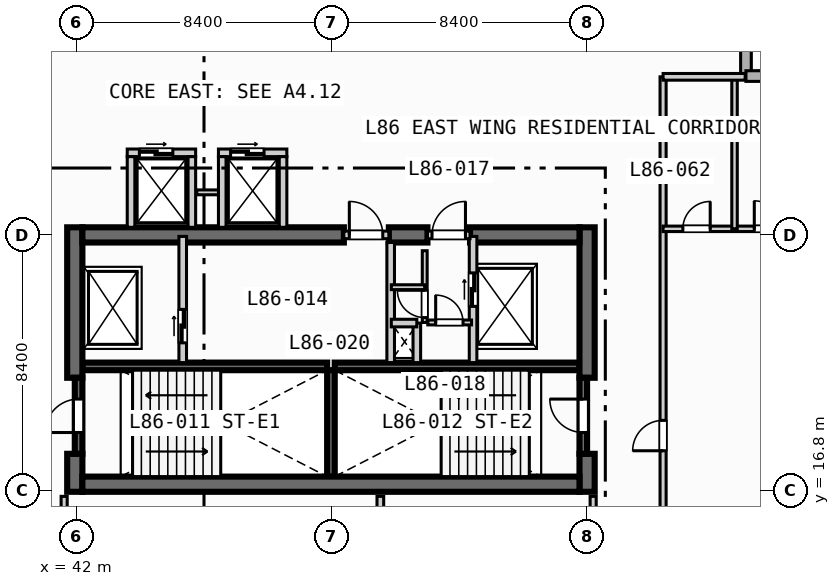
"""IFC4 building model, lengths in metres.
Left out: names, types, materials, properties, quantities, classifications, styles, units other than length and angle.
Written with IfcOpenShell. Run it as: python <this file> out.ifc"""

import sys

from ifc_helpers import new_model, si_unit, direction, frame, frame_2d, origin, place, context, subcontext, project, spatial, rectangle, extrude, element, fill, save


model = new_model("IFC4")
c1 = context("Model", 3, precision=1e-05, world=origin(), true_north=direction((0.0, 1.0)))
c2 = subcontext(c1, "Body", "Model", "MODEL_VIEW")
j1 = project(units=[si_unit("LENGTHUNIT", "METRE"), si_unit("PLANEANGLEUNIT", "RADIAN")], contexts=[c1])
p1 = place(None, origin())
s1 = spatial("IfcSite", under=j1, at=p1, CompositionType="ELEMENT")
p2 = place(p1, origin())
s2 = spatial("IfcBuilding", under=s1, at=p2, CompositionType="ELEMENT")
p3 = place(p2, frame((0.0, 0.0, 347.6)))
s3 = spatial("IfcBuildingStorey", under=s2, at=p3, CompositionType="ELEMENT", Elevation=347.6)
for number, where, z_axis, x_axis in (
    (1, (42.2, 20.875, 0.0), (0.0, 0.0, 1.0), (1.0, 0.0, 0.0)),
    (2, (50.5, 20.875, 0.0), (0.0, 0.0, 1.0), (1.0, 0.0, 0.0)),
):
    element("IfcWall", number, at=place(p3, frame(where, z_axis=z_axis, x_axis=x_axis)), inside=s3, PredefinedType="SOLIDWALL", context=c2, shape_type="SweptSolid", body=[
        extrude(rectangle(XDim=8.05, YDim=0.25, at=frame_2d((4.025, 0.0))), origin(), (0.0, 0.0, 1.0), 3.67),
    ])
p4 = place(p3, frame((50.375, 17.25, 0.0), z_axis=(0.0, 0.0, 1.0), x_axis=(0.0, 1.0, 0.0)))
e3 = element("IfcWall", 3, at=p4, inside=s3, PredefinedType="SOLIDWALL", context=c2, shape_type="SweptSolid", body=[
    extrude(rectangle(XDim=3.5, YDim=0.25, at=frame_2d((1.75, 0.0))), origin(), (0.0, 0.0, 1.0), 3.67),
])
p5 = place(p3, frame((41.95, 16.75, 0.0), z_axis=(0.0, 0.0, 1.0), x_axis=(0.0, 1.0, 0.0)))
e4 = element("IfcWall", 4, at=p5, inside=s3, PredefinedType="SHEAR", context=c2, shape_type="SweptSolid", body=[
    extrude(rectangle(XDim=1.25, YDim=0.5, at=frame_2d((0.625, 0.0))), origin(), (0.0, 0.0, 1.0), 3.67),
])
p6 = place(p3, frame((41.95, 20.5, 0.0), z_axis=(0.0, 0.0, 1.0), x_axis=(0.0, 1.0, 0.0)))
e5 = element("IfcWall", 5, at=p6, inside=s3, PredefinedType="SHEAR", context=c2, shape_type="SweptSolid", body=[
    extrude(rectangle(XDim=4.95, YDim=0.5, at=frame_2d((2.475, 0.0))), origin(), (0.0, 0.0, 1.0), 3.67),
])
p7 = place(p3, frame((58.8, 16.75, 0.0), z_axis=(0.0, 0.0, 1.0), x_axis=(0.0, 1.0, 0.0)))
e6 = element("IfcWall", 6, at=p7, inside=s3, PredefinedType="SHEAR", context=c2, shape_type="SweptSolid", body=[
    extrude(rectangle(XDim=1.25, YDim=0.5, at=frame_2d((0.625, 0.0))), origin(), (0.0, 0.0, 1.0), 3.67),
])
p8 = place(p3, frame((58.8, 20.5, 0.0), z_axis=(0.0, 0.0, 1.0), x_axis=(0.0, 1.0, 0.0)))
e7 = element("IfcWall", 7, at=p8, inside=s3, PredefinedType="SHEAR", context=c2, shape_type="SweptSolid", body=[
    extrude(rectangle(XDim=4.95, YDim=0.5, at=frame_2d((2.475, 0.0))), origin(), (0.0, 0.0, 1.0), 3.67),
])
p9 = place(p3, frame((42.2, 17.0, 0.0), z_axis=(0.0, 0.0, 1.0), x_axis=(1.0, 0.0, 0.0)))
e8 = element("IfcWall", 8, at=p9, inside=s3, PredefinedType="SHEAR", context=c2, shape_type="SweptSolid", body=[
    extrude(rectangle(XDim=16.35, YDim=0.5, at=frame_2d((8.175, 0.0))), origin(), (0.0, 0.0, 1.0), 3.67),
])
p10 = place(p3, frame((42.2, 25.2, 0.0), z_axis=(0.0, 0.0, 1.0), x_axis=(1.0, 0.0, 0.0)))
e9 = element("IfcWall", 9, at=p10, inside=s3, PredefinedType="SHEAR", context=c2, shape_type="SweptSolid", body=[
    extrude(rectangle(XDim=8.6, YDim=0.5, at=frame_2d((4.3, 0.0))), origin(), (0.0, 0.0, 1.0), 3.67),
])
p11 = place(p3, frame((52.28, 25.2, 0.0), z_axis=(0.0, 0.0, 1.0), x_axis=(1.0, 0.0, 0.0)))
e10 = element("IfcWall", 10, at=p11, inside=s3, PredefinedType="SHEAR", context=c2, shape_type="SweptSolid", body=[
    extrude(rectangle(XDim=1.27, YDim=0.5, at=frame_2d((0.635, 0.0))), origin(), (0.0, 0.0, 1.0), 3.67),
])
p12 = place(p3, frame((54.95, 25.2, 0.0), z_axis=(0.0, 0.0, 1.0), x_axis=(1.0, 0.0, 0.0)))
e11 = element("IfcWall", 11, at=p12, inside=s3, PredefinedType="SHEAR", context=c2, shape_type="SweptSolid", body=[
    extrude(rectangle(XDim=3.6, YDim=0.5, at=frame_2d((1.8, 0.0))), origin(), (0.0, 0.0, 1.0), 3.67),
])
for number, where, z_axis, x_axis in (
    (12, (64.025, 33.425, 0.0), (0.0, 0.0, 1.0), (0.0, -1.0, 0.0)),
    (13, (64.025, 30.425, 0.0), (0.0, 0.0, 1.0), (1.0, 0.0, 0.0)),
):
    element("IfcWall", number, at=place(p3, frame(where, z_axis=z_axis, x_axis=x_axis)), inside=s3, PredefinedType="STANDARD", context=c2, shape_type="SweptSolid", body=[
        extrude(rectangle(XDim=3.0, YDim=0.35, at=frame_2d((1.5, 0.0))), origin(), (0.0, 0.0, 1.0), 3.67),
    ])
p13 = place(p3, frame((42.075, 18.0, 0.0), z_axis=(0.0, 0.0, 1.0), x_axis=(0.0, 1.0, 0.0)))
e14 = element("IfcWall", 14, at=p13, inside=s3, PredefinedType="SOLIDWALL", context=c2, shape_type="SweptSolid", body=[
    extrude(rectangle(XDim=2.5, YDim=0.25, at=frame_2d((1.25, 0.0))), origin(), (0.0, 0.0, 1.0), 3.67),
])
p14 = place(p13, frame((0.7, 0.0, 0.0)))
e15 = element("IfcOpeningElement", 15, at=p14, cuts=e14, PredefinedType="OPENING", context=c2, shape_type="SweptSolid", body=[
    extrude(rectangle(XDim=1.1, YDim=2.15, at=frame_2d((0.55, 1.075))), frame((0.0, 0.135, 0.0), z_axis=(0.0, -1.0, 0.0), x_axis=(1.0, 0.0, 0.0)), (0.0, 0.0, 1.0), 0.27),
])
p15 = place(p3, frame((58.675, 18.0, 0.0), z_axis=(0.0, 0.0, 1.0), x_axis=(0.0, 1.0, 0.0)))
e16 = element("IfcWall", 16, at=p15, inside=s3, PredefinedType="SOLIDWALL", context=c2, shape_type="SweptSolid", body=[
    extrude(rectangle(XDim=2.5, YDim=0.25, at=frame_2d((1.25, 0.0))), origin(), (0.0, 0.0, 1.0), 3.67),
])
p16 = place(p15, frame((0.7, 0.0, 0.0)))
e17 = element("IfcOpeningElement", 17, at=p16, cuts=e16, PredefinedType="OPENING", context=c2, shape_type="SweptSolid", body=[
    extrude(rectangle(XDim=1.1, YDim=2.15, at=frame_2d((0.55, 1.075))), frame((0.0, 0.135, 0.0), z_axis=(0.0, -1.0, 0.0), x_axis=(1.0, 0.0, 0.0)), (0.0, 0.0, 1.0), 0.27),
])
p17 = place(p3, frame((45.5, 21.0, 0.0), z_axis=(0.0, 0.0, 1.0), x_axis=(0.0, 1.0, 0.0)))
e18 = element("IfcWall", 18, at=p17, inside=s3, PredefinedType="SOLIDWALL", context=c2, shape_type="SweptSolid", body=[
    extrude(rectangle(XDim=4.15, YDim=0.25, at=frame_2d((2.075, 0.0))), origin(), (0.0, 0.0, 1.0), 3.67),
])
p18 = place(p17, frame((0.65, 0.0, 0.0)))
e19 = element("IfcOpeningElement", 19, at=p18, cuts=e18, PredefinedType="OPENING", context=c2, shape_type="SweptSolid", body=[
    extrude(rectangle(XDim=1.1, YDim=2.15, at=frame_2d((0.55, 1.075))), frame((0.0, 0.135, 0.0), z_axis=(0.0, -1.0, 0.0), x_axis=(1.0, 0.0, 0.0)), (0.0, 0.0, 1.0), 0.27),
])
p19 = place(p3, frame((50.8, 25.2, 0.0), z_axis=(0.0, 0.0, 1.0), x_axis=(1.0, 0.0, 0.0)))
e20 = element("IfcWall", 20, at=p19, inside=s3, PredefinedType="SOLIDWALL", context=c2, shape_type="SweptSolid", body=[
    extrude(rectangle(XDim=1.48, YDim=0.25, at=frame_2d((0.74, 0.0))), origin(), (0.0, 0.0, 1.0), 3.67),
])
p20 = place(p19, frame((0.18, 0.0, 0.0)))
e21 = element("IfcOpeningElement", 21, at=p20, cuts=e20, PredefinedType="OPENING", context=c2, shape_type="SweptSolid", body=[
    extrude(rectangle(XDim=1.1, YDim=2.15, at=frame_2d((0.55, 1.075))), frame((0.0, 0.135, 0.0), z_axis=(0.0, -1.0, 0.0), x_axis=(1.0, 0.0, 0.0)), (0.0, 0.0, 1.0), 0.27),
])
p21 = place(p3, frame((52.34, 21.0, 0.0), z_axis=(0.0, 0.0, 1.0), x_axis=(0.0, 1.0, 0.0)))
e22 = element("IfcWall", 22, at=p21, inside=s3, PredefinedType="SOLIDWALL", context=c2, shape_type="SweptSolid", body=[
    extrude(rectangle(XDim=3.95, YDim=0.25, at=frame_2d((1.975, 0.0))), origin(), (0.0, 0.0, 1.0), 3.67),
])
p22 = place(p3, frame((55.05, 21.0, 0.0), z_axis=(0.0, 0.0, 1.0), x_axis=(0.0, 1.0, 0.0)))
e23 = element("IfcWall", 23, at=p22, inside=s3, PredefinedType="SOLIDWALL", context=c2, shape_type="SweptSolid", body=[
    extrude(rectangle(XDim=4.15, YDim=0.25, at=frame_2d((2.075, 0.0))), origin(), (0.0, 0.0, 1.0), 3.67),
])
p23 = place(p22, frame((1.85, 0.0, 0.0)))
e24 = element("IfcOpeningElement", 24, at=p23, cuts=e23, PredefinedType="OPENING", context=c2, shape_type="SweptSolid", body=[
    extrude(rectangle(XDim=1.1, YDim=2.15, at=frame_2d((0.55, 1.075))), frame((0.0, 0.135, 0.0), z_axis=(0.0, -1.0, 0.0), x_axis=(1.0, 0.0, 0.0)), (0.0, 0.0, 1.0), 0.27),
])
p24 = place(p3, frame((53.55, 25.2, 0.0), z_axis=(0.0, 0.0, 1.0), x_axis=(1.0, 0.0, 0.0)))
e25 = element("IfcWall", 25, at=p24, inside=s3, PredefinedType="SOLIDWALL", context=c2, shape_type="SweptSolid", body=[
    extrude(rectangle(XDim=1.4, YDim=0.25, at=frame_2d((0.7, 0.0))), origin(), (0.0, 0.0, 1.0), 3.67),
])
p25 = place(p24, frame((0.15, 0.0, 0.0)))
e26 = element("IfcOpeningElement", 26, at=p25, cuts=e25, PredefinedType="OPENING", context=c2, shape_type="SweptSolid", body=[
    extrude(rectangle(XDim=1.1, YDim=2.15, at=frame_2d((0.55, 1.075))), frame((0.0, 0.135, 0.0), z_axis=(0.0, -1.0, 0.0), x_axis=(1.0, 0.0, 0.0)), (0.0, 0.0, 1.0), 0.27),
])
p26 = place(p3, frame((53.2, 21.0, 0.0), z_axis=(0.0, 0.0, 1.0), x_axis=(0.0, 1.0, 0.0)))
e27 = element("IfcWall", 27, at=p26, inside=s3, PredefinedType="SOLIDWALL", context=c2, shape_type="SweptSolid", body=[
    extrude(rectangle(XDim=1.3, YDim=0.25, at=frame_2d((0.65, 0.0))), origin(), (0.0, 0.0, 1.0), 3.67),
])
p27 = place(p3, frame((52.36, 22.3, 0.0), z_axis=(0.0, 0.0, 1.0), x_axis=(1.0, 0.0, 0.0)))
e28 = element("IfcWall", 28, at=p27, inside=s3, PredefinedType="SOLIDWALL", context=c2, shape_type="SweptSolid", body=[
    extrude(rectangle(XDim=0.84, YDim=0.25, at=frame_2d((0.42, 0.0))), origin(), (0.0, 0.0, 1.0), 3.67),
])
p28 = place(p3, frame((53.56, 22.32, 0.0), z_axis=(0.0, 0.0, 1.0), x_axis=(1.0, 0.0, 0.0)))
e29 = element("IfcWall", 29, at=p28, inside=s3, PredefinedType="PARTITIONING", context=c2, shape_type="SweptSolid", body=[
    extrude(rectangle(XDim=1.44, YDim=0.16, at=frame_2d((0.72, 0.0))), origin(), (0.0, 0.0, 1.0), 3.67),
])
p29 = place(p28, frame((0.26, 0.0, 0.0)))
e30 = element("IfcOpeningElement", 30, at=p29, cuts=e29, PredefinedType="OPENING", context=c2, shape_type="SweptSolid", body=[
    extrude(rectangle(XDim=0.9, YDim=2.1, at=frame_2d((0.45, 1.05))), frame((0.0, 0.09, 0.0), z_axis=(0.0, -1.0, 0.0), x_axis=(1.0, 0.0, 0.0)), (0.0, 0.0, 1.0), 0.18),
])
p30 = place(p3, frame((53.46, 22.32, 0.0), z_axis=(0.0, 0.0, 1.0), x_axis=(0.0, 1.0, 0.0)))
e31 = element("IfcWall", 31, at=p30, inside=s3, PredefinedType="PARTITIONING", context=c2, shape_type="SweptSolid", body=[
    extrude(rectangle(XDim=2.36, YDim=0.16, at=frame_2d((1.18, 0.0))), origin(), (0.0, 0.0, 1.0), 3.67),
])
p31 = place(p30, frame((0.16, 0.0, 0.0)))
e32 = element("IfcOpeningElement", 32, at=p31, cuts=e31, PredefinedType="OPENING", context=c2, shape_type="SweptSolid", body=[
    extrude(rectangle(XDim=0.9, YDim=2.1, at=frame_2d((0.45, 1.05))), frame((0.0, 0.09, 0.0), z_axis=(0.0, -1.0, 0.0), x_axis=(1.0, 0.0, 0.0)), (0.0, 0.0, 1.0), 0.18),
])
p32 = place(p3, frame((52.36, 23.48, 0.0), z_axis=(0.0, 0.0, 1.0), x_axis=(1.0, 0.0, 0.0)))
e33 = element("IfcWall", 33, at=p32, inside=s3, PredefinedType="PARTITIONING", context=c2, shape_type="SweptSolid", body=[
    extrude(rectangle(XDim=1.1, YDim=0.16, at=frame_2d((0.55, 0.0))), origin(), (0.0, 0.0, 1.0), 3.67),
])
p33 = place(p3, frame((43.675, 27.9, 0.0), z_axis=(0.0, 0.0, 1.0), x_axis=(1.0, 0.0, 0.0)))
e34 = element("IfcWall", 34, at=p33, inside=s3, PredefinedType="SOLIDWALL", context=c2, shape_type="SweptSolid", body=[
    extrude(rectangle(XDim=2.25, YDim=0.25, at=frame_2d((1.125, 0.0))), origin(), (0.0, 0.0, 1.0), 3.67),
])
p34 = place(p33, frame((0.4, 0.0, 0.0)))
e35 = element("IfcOpeningElement", 35, at=p34, cuts=e34, PredefinedType="OPENING", context=c2, shape_type="SweptSolid", body=[
    extrude(rectangle(XDim=1.1, YDim=2.15, at=frame_2d((0.55, 1.075))), frame((0.0, 0.135, 0.0), z_axis=(0.0, -1.0, 0.0), x_axis=(1.0, 0.0, 0.0)), (0.0, 0.0, 1.0), 0.27),
])
for number, where, z_axis, x_axis in (
    (36, (43.8, 25.45, 0.0), (0.0, 0.0, 1.0), (0.0, 1.0, 0.0)),
    (37, (45.8, 25.45, 0.0), (0.0, 0.0, 1.0), (0.0, 1.0, 0.0)),
):
    element("IfcWall", number, at=place(p3, frame(where, z_axis=z_axis, x_axis=x_axis)), inside=s3, PredefinedType="SOLIDWALL", context=c2, shape_type="SweptSolid", body=[
        extrude(rectangle(XDim=2.325, YDim=0.25, at=frame_2d((1.163, 0.0))), origin(), (0.0, 0.0, 1.0), 3.67),
    ])
p35 = place(p3, frame((45.96, 26.6, 0.0), z_axis=(0.0, 0.0, 1.0), x_axis=(1.0, 0.0, 0.0)))
e38 = element("IfcWall", 38, at=p35, inside=s3, PredefinedType="PARTITIONING", context=c2, shape_type="SweptSolid", body=[
    extrude(rectangle(XDim=0.88, YDim=0.16, at=frame_2d((0.44, 0.0))), origin(), (0.0, 0.0, 1.0), 3.67),
])
p36 = place(p3, frame((46.675, 27.9, 0.0), z_axis=(0.0, 0.0, 1.0), x_axis=(1.0, 0.0, 0.0)))
e39 = element("IfcWall", 39, at=p36, inside=s3, PredefinedType="SOLIDWALL", context=c2, shape_type="SweptSolid", body=[
    extrude(rectangle(XDim=2.25, YDim=0.25, at=frame_2d((1.125, 0.0))), origin(), (0.0, 0.0, 1.0), 3.67),
])
p37 = place(p36, frame((0.4, 0.0, 0.0)))
e40 = element("IfcOpeningElement", 40, at=p37, cuts=e39, PredefinedType="OPENING", context=c2, shape_type="SweptSolid", body=[
    extrude(rectangle(XDim=1.1, YDim=2.15, at=frame_2d((0.55, 1.075))), frame((0.0, 0.135, 0.0), z_axis=(0.0, -1.0, 0.0), x_axis=(1.0, 0.0, 0.0)), (0.0, 0.0, 1.0), 0.27),
])
for number, where, z_axis, x_axis in (
    (41, (46.8, 25.45, 0.0), (0.0, 0.0, 1.0), (0.0, 1.0, 0.0)),
    (42, (48.8, 25.45, 0.0), (0.0, 0.0, 1.0), (0.0, 1.0, 0.0)),
):
    element("IfcWall", number, at=place(p3, frame(where, z_axis=z_axis, x_axis=x_axis)), inside=s3, PredefinedType="SOLIDWALL", context=c2, shape_type="SweptSolid", body=[
        extrude(rectangle(XDim=2.325, YDim=0.25, at=frame_2d((1.163, 0.0))), origin(), (0.0, 0.0, 1.0), 3.67),
    ])
p38 = place(p3, frame((41.6, 8.65, 0.0), z_axis=(0.0, 0.0, 1.0), x_axis=(0.0, 1.0, 0.0)))
e43 = element("IfcWall", 43, at=p38, inside=s3, PredefinedType="PARTITIONING", context=c2, shape_type="SweptSolid", body=[
    extrude(rectangle(XDim=7.95, YDim=0.2, at=frame_2d((3.975, 0.0))), origin(), (0.0, 0.0, 1.0), 3.67),
])
p39 = place(p38, frame((2.2, 0.0, 0.0)))
e44 = element("IfcOpeningElement", 44, at=p39, cuts=e43, PredefinedType="OPENING", context=c2, shape_type="SweptSolid", body=[
    extrude(rectangle(XDim=0.92, YDim=2.1, at=frame_2d((0.46, 1.05))), frame((0.0, 0.11, 0.0), z_axis=(0.0, -1.0, 0.0), x_axis=(1.0, 0.0, 0.0)), (0.0, 0.0, 1.0), 0.22),
])
p40 = place(p3, frame((59.0, 8.65, 0.0), z_axis=(0.0, 0.0, 1.0), x_axis=(0.0, 1.0, 0.0)))
e45 = element("IfcWall", 45, at=p40, inside=s3, PredefinedType="PARTITIONING", context=c2, shape_type="SweptSolid", body=[
    extrude(rectangle(XDim=7.95, YDim=0.2, at=frame_2d((3.975, 0.0))), origin(), (0.0, 0.0, 1.0), 3.059),
])
p41 = place(p40, frame((2.2, 0.0, 0.0)))
e46 = element("IfcOpeningElement", 46, at=p41, cuts=e45, PredefinedType="OPENING", context=c2, shape_type="SweptSolid", body=[
    extrude(rectangle(XDim=0.92, YDim=2.1, at=frame_2d((0.46, 1.05))), frame((0.0, 0.11, 0.0), z_axis=(0.0, -1.0, 0.0), x_axis=(1.0, 0.0, 0.0)), (0.0, 0.0, 1.0), 0.22),
])
p42 = place(p3, frame((52.0, 8.65, 0.0), z_axis=(0.0, 0.0, 1.0), x_axis=(0.0, 1.0, 0.0)))
e47 = element("IfcWall", 47, at=p42, inside=s3, PredefinedType="PARTITIONING", context=c2, shape_type="SweptSolid", body=[
    extrude(rectangle(XDim=7.95, YDim=0.22, at=frame_2d((3.975, 0.0))), origin(), (0.0, 0.0, 1.0), 3.67),
])
p43 = place(p3, frame((61.3, 11.6, 0.0), z_axis=(0.0, 0.0, 1.0), x_axis=(0.0, 1.0, 0.0)))
e48 = element("IfcWall", 48, at=p43, inside=s3, PredefinedType="PARTITIONING", context=c2, shape_type="SweptSolid", body=[
    extrude(rectangle(XDim=18.8, YDim=0.2, at=frame_2d((9.4, 0.0))), origin(), (0.0, 0.0, 1.0), 3.67),
])
p44 = place(p43, frame((6.5, 0.0, 0.0)))
e49 = element("IfcOpeningElement", 49, at=p44, cuts=e48, PredefinedType="OPENING", context=c2, shape_type="SweptSolid", body=[
    extrude(rectangle(XDim=1.0, YDim=2.15, at=frame_2d((0.5, 1.075))), frame((0.0, 0.11, 0.0), z_axis=(0.0, -1.0, 0.0), x_axis=(1.0, 0.0, 0.0)), (0.0, 0.0, 1.0), 0.22),
])
p45 = place(p3, frame((61.3, 25.4, 0.0), z_axis=(0.0, 0.0, 1.0), x_axis=(1.0, 0.0, 0.0)))
e50 = element("IfcWall", 50, at=p45, inside=s3, PredefinedType="PLUMBINGWALL", context=c2, shape_type="SweptSolid", body=[
    extrude(rectangle(XDim=5.5, YDim=0.18, at=frame_2d((2.75, 0.0))), origin(), (0.0, 0.0, 1.0), 3.07),
])
p46 = place(p45, frame((0.65, 0.0, 0.0)))
e51 = element("IfcOpeningElement", 51, at=p46, cuts=e50, PredefinedType="OPENING", context=c2, shape_type="SweptSolid", body=[
    extrude(rectangle(XDim=0.9, YDim=2.1, at=frame_2d((0.45, 1.05))), frame((0.0, 0.1, 0.0), z_axis=(0.0, -1.0, 0.0), x_axis=(1.0, 0.0, 0.0)), (0.0, 0.0, 1.0), 0.2),
])
p47 = place(p45, frame((3.0, 0.0, 0.0)))
e52 = element("IfcOpeningElement", 52, at=p47, cuts=e50, PredefinedType="OPENING", context=c2, shape_type="SweptSolid", body=[
    extrude(rectangle(XDim=0.92, YDim=2.1, at=frame_2d((0.46, 1.05))), frame((0.0, 0.1, 0.0), z_axis=(0.0, -1.0, 0.0), x_axis=(1.0, 0.0, 0.0)), (0.0, 0.0, 1.0), 0.2),
])
p48 = place(p3, frame((63.65, 25.4, 0.0), z_axis=(0.0, 0.0, 1.0), x_axis=(0.0, 1.0, 0.0)))
e53 = element("IfcWall", 53, at=p48, inside=s3, PredefinedType="PLUMBINGWALL", context=c2, shape_type="SweptSolid", body=[
    extrude(rectangle(XDim=5.0, YDim=0.18, at=frame_2d((2.5, 0.0))), origin(), (0.0, 0.0, 1.0), 3.67),
])
p49 = place(p3, frame((61.3, 30.4, 0.0), z_axis=(0.0, 0.0, 1.0), x_axis=(1.0, 0.0, 0.0)))
e54 = element("IfcWall", 54, at=p49, inside=s3, PredefinedType="PARTITIONING", context=c2, shape_type="SweptSolid", body=[
    extrude(rectangle(XDim=2.7, YDim=0.22, at=frame_2d((1.35, 0.0))), origin(), (0.0, 0.0, 1.0), 3.67),
])
p50 = place(p14, origin())
e55 = element("IfcDoor", 55, at=p50, inside=s3, OperationType="SINGLE_SWING_LEFT", PredefinedType="DOOR", context=c2, shape_type="SweptSolid", body=[
    extrude(rectangle(XDim=1.1, YDim=2.15, at=frame_2d((0.55, 1.075))), frame((0.0, 0.025, 0.0), z_axis=(0.0, -1.0, 0.0), x_axis=(1.0, 0.0, 0.0)), (0.0, 0.0, 1.0), 0.05),
])
fill(e15, e55)
p51 = place(p16, origin())
e56 = element("IfcDoor", 56, at=p51, inside=s3, OperationType="SINGLE_SWING_RIGHT", PredefinedType="DOOR", context=c2, shape_type="SweptSolid", body=[
    extrude(rectangle(XDim=1.1, YDim=2.15, at=frame_2d((0.55, 1.075))), frame((0.0, 0.025, 0.0), z_axis=(0.0, -1.0, 0.0), x_axis=(1.0, 0.0, 0.0)), (0.0, 0.0, 1.0), 0.05),
])
fill(e17, e56)
p52 = place(p18, origin())
e57 = element("IfcDoor", 57, at=p52, inside=s3, OperationType="SLIDING_TO_LEFT", PredefinedType="DOOR", context=c2, shape_type="SweptSolid", body=[
    extrude(rectangle(XDim=1.1, YDim=2.15, at=frame_2d((0.55, 1.075))), frame((0.0, 0.025, 0.0), z_axis=(0.0, -1.0, 0.0), x_axis=(1.0, 0.0, 0.0)), (0.0, 0.0, 1.0), 0.05),
])
fill(e19, e57)
p53 = place(p20, origin())
e58 = element("IfcDoor", 58, at=p53, inside=s3, OperationType="SINGLE_SWING_LEFT", PredefinedType="DOOR", context=c2, shape_type="SweptSolid", body=[
    extrude(rectangle(XDim=1.1, YDim=2.15, at=frame_2d((0.55, 1.075))), frame((0.0, 0.025, 0.0), z_axis=(0.0, -1.0, 0.0), x_axis=(1.0, 0.0, 0.0)), (0.0, 0.0, 1.0), 0.05),
])
fill(e21, e58)
p54 = place(p23, origin())
e59 = element("IfcDoor", 59, at=p54, inside=s3, OperationType="SLIDING_TO_LEFT", PredefinedType="DOOR", context=c2, shape_type="SweptSolid", body=[
    extrude(rectangle(XDim=1.1, YDim=2.15, at=frame_2d((0.55, 1.075))), frame((0.0, 0.025, 0.0), z_axis=(0.0, -1.0, 0.0), x_axis=(1.0, 0.0, 0.0)), (0.0, 0.0, 1.0), 0.05),
])
fill(e24, e59)
p55 = place(p25, origin())
e60 = element("IfcDoor", 60, at=p55, inside=s3, OperationType="SINGLE_SWING_RIGHT", PredefinedType="DOOR", context=c2, shape_type="SweptSolid", body=[
    extrude(rectangle(XDim=1.1, YDim=2.15, at=frame_2d((0.55, 1.075))), frame((0.0, 0.025, 0.0), z_axis=(0.0, -1.0, 0.0), x_axis=(1.0, 0.0, 0.0)), (0.0, 0.0, 1.0), 0.05),
])
fill(e26, e60)
p56 = place(p29, origin())
e61 = element("IfcDoor", 61, at=p56, inside=s3, OperationType="SINGLE_SWING_LEFT", PredefinedType="DOOR", context=c2, shape_type="SweptSolid", body=[
    extrude(rectangle(XDim=0.9, YDim=2.1, at=frame_2d((0.45, 1.05))), frame((0.0, 0.025, 0.0), z_axis=(0.0, -1.0, 0.0), x_axis=(1.0, 0.0, 0.0)), (0.0, 0.0, 1.0), 0.05),
])
fill(e30, e61)
p57 = place(p31, origin())
e62 = element("IfcDoor", 62, at=p57, inside=s3, OperationType="SINGLE_SWING_RIGHT", PredefinedType="DOOR", context=c2, shape_type="SweptSolid", body=[
    extrude(rectangle(XDim=0.9, YDim=2.1, at=frame_2d((0.45, 1.05))), frame((0.0, 0.025, 0.0), z_axis=(0.0, -1.0, 0.0), x_axis=(1.0, 0.0, 0.0)), (0.0, 0.0, 1.0), 0.05),
])
fill(e32, e62)
p58 = place(p34, origin())
e63 = element("IfcDoor", 63, at=p58, inside=s3, OperationType="SLIDING_TO_LEFT", PredefinedType="DOOR", context=c2, shape_type="SweptSolid", body=[
    extrude(rectangle(XDim=1.1, YDim=2.15, at=frame_2d((0.55, 1.075))), frame((0.0, 0.025, 0.0), z_axis=(0.0, -1.0, 0.0), x_axis=(1.0, 0.0, 0.0)), (0.0, 0.0, 1.0), 0.05),
])
fill(e35, e63)
p59 = place(p37, origin())
e64 = element("IfcDoor", 64, at=p59, inside=s3, OperationType="SLIDING_TO_LEFT", PredefinedType="DOOR", context=c2, shape_type="SweptSolid", body=[
    extrude(rectangle(XDim=1.1, YDim=2.15, at=frame_2d((0.55, 1.075))), frame((0.0, 0.025, 0.0), z_axis=(0.0, -1.0, 0.0), x_axis=(1.0, 0.0, 0.0)), (0.0, 0.0, 1.0), 0.05),
])
fill(e40, e64)
p60 = place(p44, origin())
e65 = element("IfcDoor", 65, at=p60, inside=s3, OperationType="SINGLE_SWING_LEFT", PredefinedType="DOOR", context=c2, shape_type="SweptSolid", body=[
    extrude(rectangle(XDim=1.0, YDim=2.15, at=frame_2d((0.5, 1.075))), frame((0.0, 0.025, 0.0), z_axis=(0.0, -1.0, 0.0), x_axis=(1.0, 0.0, 0.0)), (0.0, 0.0, 1.0), 0.05),
])
fill(e49, e65)
p61 = place(p46, origin())
e66 = element("IfcDoor", 66, at=p61, inside=s3, OperationType="SINGLE_SWING_RIGHT", PredefinedType="DOOR", context=c2, shape_type="SweptSolid", body=[
    extrude(rectangle(XDim=0.9, YDim=2.1, at=frame_2d((0.45, 1.05))), frame((0.0, 0.025, 0.0), z_axis=(0.0, -1.0, 0.0), x_axis=(1.0, 0.0, 0.0)), (0.0, 0.0, 1.0), 0.05),
])
fill(e51, e66)
p62 = place(p47, origin())
e67 = element("IfcDoor", 67, at=p62, inside=s3, OperationType="SINGLE_SWING_LEFT", PredefinedType="DOOR", context=c2, shape_type="SweptSolid", body=[
    extrude(rectangle(XDim=0.92, YDim=2.1, at=frame_2d((0.46, 1.05))), frame((0.0, 0.025, 0.0), z_axis=(0.0, -1.0, 0.0), x_axis=(1.0, 0.0, 0.0)), (0.0, 0.0, 1.0), 0.05),
])
fill(e52, e67)
save(model, sys.argv[1])
